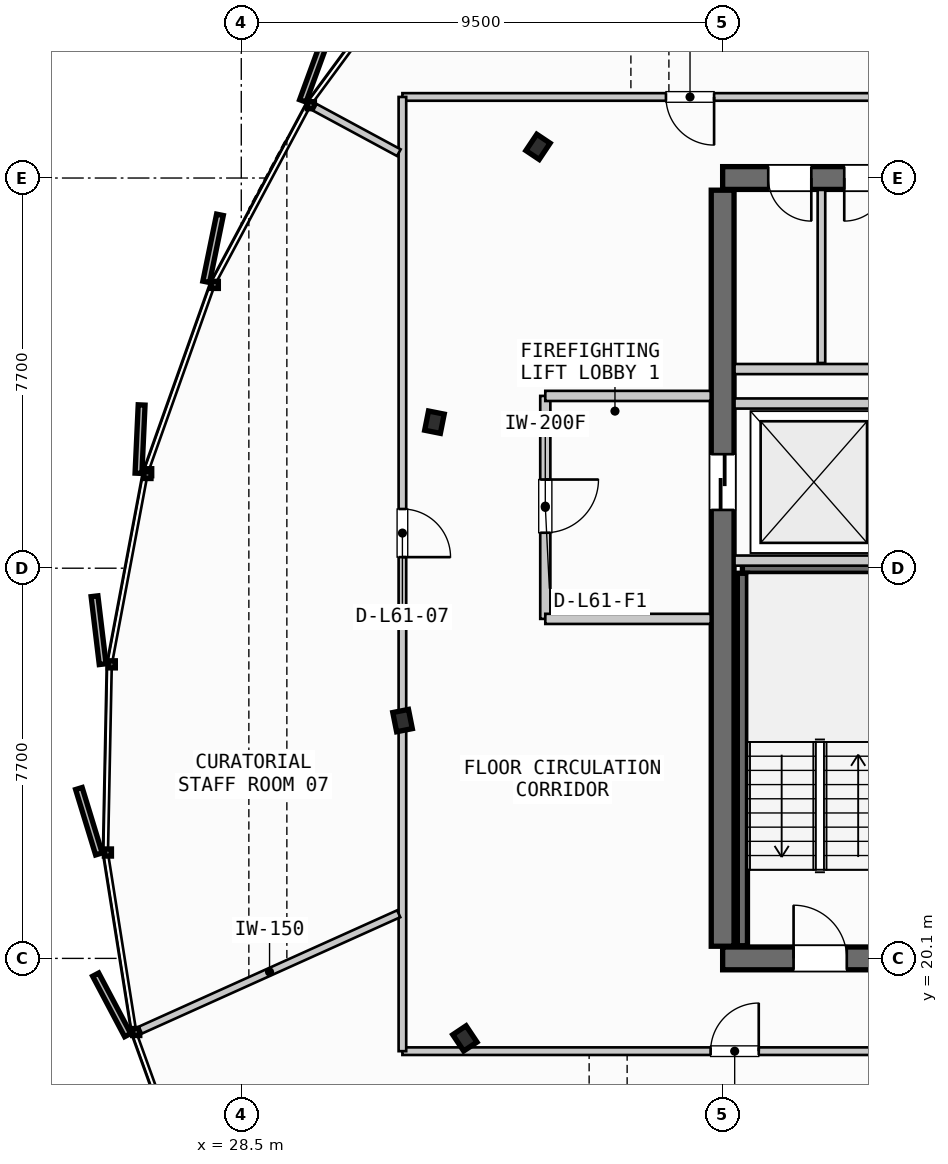
"""IFC4 building model, lengths in metres.
Left out: names, types, materials, properties, quantities, classifications, styles, units other than length and angle.
Written with IfcOpenShell. Run it as: python <this file> out.ifc"""

import sys

from ifc_helpers import new_model, si_unit, direction, frame, frame_2d, origin, origin_2d, place, context, subcontext, project, spatial, rectangle, i_section, extrude, source, transform, mapped, element, fill, save


model = new_model("IFC4")
c1 = context("Model", 3, precision=1e-05, world=origin(), true_north=direction((0.0, 1.0)))
c2 = subcontext(c1, "Body", "Model", "MODEL_VIEW")
j1 = project(units=[si_unit("LENGTHUNIT", "METRE"), si_unit("PLANEANGLEUNIT", "RADIAN")], contexts=[c1])
p1 = place(None, origin())
s1 = spatial("IfcSite", under=j1, at=p1, CompositionType="ELEMENT")
p2 = place(p1, origin())
s2 = spatial("IfcBuilding", under=s1, at=p2, CompositionType="ELEMENT")
p3 = place(p2, frame((0.0, 0.0, 235.3)))
s3 = spatial("IfcBuildingStorey", under=s2, at=p3, CompositionType="ELEMENT", Elevation=235.3)
p4 = place(p3, frame((38.0, 20.1, 0.0), z_axis=(0.0, 0.0, 1.0), x_axis=(1.0, 0.0, 0.0)))
e1 = element("IfcWall", 1, at=p4, inside=s3, PredefinedType="SHEAR", context=c2, shape_type="SweptSolid", body=[
    extrude(rectangle(XDim=17.6, YDim=0.45, at=frame_2d((8.8, 0.0))), origin(), (0.0, 0.0, 1.0), 3.21),
])
p5 = place(p4, frame((1.4, 0.0, 0.0)))
e2 = element("IfcOpeningElement", 2, at=p5, cuts=e1, PredefinedType="OPENING", context=c2, shape_type="SweptSolid", body=[
    extrude(rectangle(XDim=1.05, YDim=2.15, at=frame_2d((0.525, 1.075))), frame((0.0, 0.235, 0.0), z_axis=(0.0, -1.0, 0.0), x_axis=(1.0, 0.0, 0.0)), (0.0, 0.0, 1.0), 0.47),
])
p6 = place(p4, frame((15.15, 0.0, 0.0)))
e3 = element("IfcOpeningElement", 3, at=p6, cuts=e1, PredefinedType="OPENING", context=c2, shape_type="SweptSolid", body=[
    extrude(rectangle(XDim=1.05, YDim=2.15, at=frame_2d((0.525, 1.075))), frame((0.0, 0.235, 0.0), z_axis=(0.0, -1.0, 0.0), x_axis=(1.0, 0.0, 0.0)), (0.0, 0.0, 1.0), 0.47),
])
p7 = place(p4, frame((5.25, 0.0, 0.0)))
e4 = element("IfcOpeningElement", 4, at=p7, cuts=e1, PredefinedType="OPENING", context=c2, shape_type="SweptSolid", body=[
    extrude(rectangle(XDim=0.95, YDim=2.15, at=frame_2d((0.475, 1.075))), frame((0.0, 0.235, 0.0), z_axis=(0.0, -1.0, 0.0), x_axis=(1.0, 0.0, 0.0)), (0.0, 0.0, 1.0), 0.47),
])
p8 = place(p4, frame((11.4, 0.0, 0.0)))
e5 = element("IfcOpeningElement", 5, at=p8, cuts=e1, PredefinedType="OPENING", context=c2, shape_type="SweptSolid", body=[
    extrude(rectangle(XDim=0.95, YDim=2.15, at=frame_2d((0.475, 1.075))), frame((0.0, 0.235, 0.0), z_axis=(0.0, -1.0, 0.0), x_axis=(1.0, 0.0, 0.0)), (0.0, 0.0, 1.0), 0.47),
])
p9 = place(p3, frame((55.6, 35.5, 0.0), z_axis=(0.0, 0.0, 1.0), x_axis=(-1.0, 0.0, 0.0)))
e6 = element("IfcWall", 6, at=p9, inside=s3, PredefinedType="SHEAR", context=c2, shape_type="SweptSolid", body=[
    extrude(rectangle(XDim=17.6, YDim=0.45, at=frame_2d((8.8, 0.0))), origin(), (0.0, 0.0, 1.0), 3.21),
])
p10 = place(p9, frame((8.05, 0.0, 0.0)))
e7 = element("IfcOpeningElement", 7, at=p10, cuts=e6, PredefinedType="OPENING", context=c2, shape_type="SweptSolid", body=[
    extrude(rectangle(XDim=1.5, YDim=2.2, at=frame_2d((0.75, 1.1))), frame((0.0, 0.235, 0.0), z_axis=(0.0, -1.0, 0.0), x_axis=(1.0, 0.0, 0.0)), (0.0, 0.0, 1.0), 0.47),
])
p11 = place(p9, frame((15.85, 0.0, 0.0)))
e8 = element("IfcOpeningElement", 8, at=p11, cuts=e6, PredefinedType="OPENING", context=c2, shape_type="SweptSolid", body=[
    extrude(rectangle(XDim=0.85, YDim=2.15, at=frame_2d((0.425, 1.075))), frame((0.0, 0.235, 0.0), z_axis=(0.0, -1.0, 0.0), x_axis=(1.0, 0.0, 0.0)), (0.0, 0.0, 1.0), 0.47),
])
p12 = place(p9, frame((14.35, 0.0, 0.0)))
e9 = element("IfcOpeningElement", 9, at=p12, cuts=e6, PredefinedType="OPENING", context=c2, shape_type="SweptSolid", body=[
    extrude(rectangle(XDim=0.85, YDim=2.15, at=frame_2d((0.425, 1.075))), frame((0.0, 0.235, 0.0), z_axis=(0.0, -1.0, 0.0), x_axis=(1.0, 0.0, 0.0)), (0.0, 0.0, 1.0), 0.47),
])
p13 = place(p9, frame((12.3, 0.0, 0.0)))
e10 = element("IfcOpeningElement", 10, at=p13, cuts=e6, PredefinedType="OPENING", context=c2, shape_type="SweptSolid", body=[
    extrude(rectangle(XDim=0.95, YDim=2.15, at=frame_2d((0.475, 1.075))), frame((0.0, 0.235, 0.0), z_axis=(0.0, -1.0, 0.0), x_axis=(1.0, 0.0, 0.0)), (0.0, 0.0, 1.0), 0.47),
])
p14 = place(p9, frame((10.2, 0.0, 0.0)))
e11 = element("IfcOpeningElement", 11, at=p14, cuts=e6, PredefinedType="OPENING", context=c2, shape_type="SweptSolid", body=[
    extrude(rectangle(XDim=0.9, YDim=2.15, at=frame_2d((0.45, 1.075))), frame((0.0, 0.235, 0.0), z_axis=(0.0, -1.0, 0.0), x_axis=(1.0, 0.0, 0.0)), (0.0, 0.0, 1.0), 0.47),
])
p15 = place(p3, frame((38.0, 35.26, 0.0), z_axis=(0.0, 0.0, 1.0), x_axis=(0.0, -1.0, 0.0)))
e12 = element("IfcWall", 12, at=p15, inside=s3, PredefinedType="SHEAR", context=c2, shape_type="SweptSolid", body=[
    extrude(rectangle(XDim=14.92, YDim=0.45, at=frame_2d((7.46, 0.0))), origin(), (0.0, 0.0, 1.0), 3.21),
])
p16 = place(p15, frame((5.21, 0.0, 0.0)))
e13 = element("IfcOpeningElement", 13, at=p16, cuts=e12, PredefinedType="OPENING", context=c2, shape_type="SweptSolid", body=[
    extrude(rectangle(XDim=1.1, YDim=2.2, at=frame_2d((0.55, 1.1))), frame((0.0, 0.235, 0.0), z_axis=(0.0, -1.0, 0.0), x_axis=(1.0, 0.0, 0.0)), (0.0, 0.0, 1.0), 0.47),
])
m1 = source(origin(), c2, "Body", "SweptSolid", [
    extrude(i_section(OverallWidth=0.387, OverallDepth=0.316, WebThickness=0.019, FlangeThickness=0.028, FilletRadius=0.015, at=origin_2d()), origin(), (0.0, 0.0, 1.0), 3.21),
])
for number, where, z_axis, x_axis in (
    (14, (34.356, 36.115, 0.0), (0.0, 0.0, 1.0), (-0.831, 0.556, 0.0)),
    (15, (32.312, 30.682, 0.0), (0.0, 0.0, 1.0), (-0.981, 0.195, 0.0)),
    (16, (31.683, 24.793, 0.0), (0.0, 0.0, 1.0), (-0.981, -0.195, 0.0)),
    (17, (32.913, 18.521, 0.0), (0.0, 0.0, 1.0), (-0.831, -0.556, 0.0)),
):
    element("IfcColumn", number, at=place(p3, frame(where, z_axis=z_axis, x_axis=x_axis)), inside=s3, PredefinedType="COLUMN", context=c2, shape_type="MappedRepresentation", body=[
        mapped(m1, transform((0.0, 0.0, 0.0), scale=1.0)),
    ])
p17 = place(p3, frame((38.39, 27.8, 0.0), z_axis=(0.0, 0.0, 1.0), x_axis=(1.0, 0.0, 0.0)))
e18 = element("IfcWall", 18, at=p17, inside=s3, PredefinedType="SHEAR", context=c2, shape_type="SweptSolid", body=[
    extrude(rectangle(XDim=3.06, YDim=0.2, at=frame_2d((1.53, 0.0))), origin(), (0.0, 0.0, 1.0), 3.21),
])
p18 = place(p3, frame((38.39, 20.35, 0.0), z_axis=(0.0, 0.0, 1.0), x_axis=(0.0, 1.0, 0.0)))
e19 = element("IfcWall", 19, at=p18, inside=s3, PredefinedType="SHEAR", context=c2, shape_type="SweptSolid", body=[
    extrude(rectangle(XDim=7.35, YDim=0.2, at=frame_2d((3.675, 0.0))), origin(), (0.0, 0.0, 1.0), 3.21),
])
for number, where, z_axis, x_axis in (
    (20, (38.235, 27.95, 0.0), (0.0, 0.0, 1.0), (1.0, 0.0, 0.0)),
    (21, (38.235, 31.05, 0.0), (0.0, 0.0, 1.0), (1.0, 0.0, 0.0)),
):
    element("IfcWall", number, at=place(p3, frame(where, z_axis=z_axis, x_axis=x_axis)), inside=s3, PredefinedType="PARTITIONING", context=c2, shape_type="SweptSolid", body=[
        extrude(rectangle(XDim=2.915, YDim=0.2, at=frame_2d((1.458, 0.0))), origin(), (0.0, 0.0, 1.0), 2.28),
    ])
p19 = place(p3, frame((34.5, 31.2, 0.0), z_axis=(0.0, 0.0, 1.0), x_axis=(0.0, -1.0, 0.0)))
e22 = element("IfcWall", 22, at=p19, inside=s3, PredefinedType="PARTITIONING", context=c2, shape_type="SweptSolid", body=[
    extrude(rectangle(XDim=4.4, YDim=0.2, at=frame_2d((2.2, 0.0))), origin(), (0.0, 0.0, 1.0), 2.28),
])
p20 = place(p19, frame((1.65, 0.0, 0.0)))
e23 = element("IfcOpeningElement", 23, at=p20, cuts=e22, PredefinedType="OPENING", context=c2, shape_type="SweptSolid", body=[
    extrude(rectangle(XDim=1.05, YDim=2.15, at=frame_2d((0.525, 1.075))), frame((0.0, 0.11, 0.0), z_axis=(0.0, -1.0, 0.0), x_axis=(1.0, 0.0, 0.0)), (0.0, 0.0, 1.0), 0.22),
])
for number, where, z_axis, x_axis in (
    (24, (34.5, 26.8, 0.0), (0.0, 0.0, 1.0), (1.0, 0.0, 0.0)),
    (25, (34.5, 31.2, 0.0), (0.0, 0.0, 1.0), (1.0, 0.0, 0.0)),
):
    element("IfcWall", number, at=place(p3, frame(where, z_axis=z_axis, x_axis=x_axis)), inside=s3, PredefinedType="PARTITIONING", context=c2, shape_type="SweptSolid", body=[
        extrude(rectangle(XDim=3.265, YDim=0.2, at=frame_2d((1.632, 0.0))), origin(), (0.0, 0.0, 1.0), 2.28),
    ])
p21 = place(p3, frame((38.235, 31.73, 0.0), z_axis=(0.0, 0.0, 1.0), x_axis=(1.0, 0.0, 0.0)))
e26 = element("IfcWall", 26, at=p21, inside=s3, PredefinedType="PARTITIONING", context=c2, shape_type="SweptSolid", body=[
    extrude(rectangle(XDim=7.565, YDim=0.2, at=frame_2d((3.782, 0.0))), origin(), (0.0, 0.0, 1.0), 2.28),
])
p22 = place(p3, frame((39.95, 31.85, 0.0), z_axis=(0.0, 0.0, 1.0), x_axis=(0.0, 1.0, 0.0)))
e27 = element("IfcWall", 27, at=p22, inside=s3, PredefinedType="PARTITIONING", context=c2, shape_type="SweptSolid", body=[
    extrude(rectangle(XDim=3.415, YDim=0.15, at=frame_2d((1.708, 0.0))), origin(), (0.0, 0.0, 1.0), 2.28),
])
p23 = place(p3, frame((31.68, 18.269, 0.0), z_axis=(0.0, 0.0, 1.0), x_axis=(1.0, 0.0, 0.0)))
e28 = element("IfcWall", 28, at=p23, inside=s3, PredefinedType="PARTITIONING", context=c2, shape_type="SweptSolid", body=[
    extrude(rectangle(XDim=28.87, YDim=0.15, at=frame_2d((14.435, 0.0))), origin(), (0.0, 0.0, 1.0), 2.28),
])
p24 = place(p23, frame((6.083, 0.0, 0.0)))
e29 = element("IfcOpeningElement", 29, at=p24, cuts=e28, PredefinedType="OPENING", context=c2, shape_type="SweptSolid", body=[
    extrude(rectangle(XDim=0.95, YDim=2.15, at=frame_2d((0.475, 1.075))), frame((0.0, 0.085, 0.0), z_axis=(0.0, -1.0, 0.0), x_axis=(1.0, 0.0, 0.0)), (0.0, 0.0, 1.0), 0.17),
])
p25 = place(p23, frame((19.003, 0.0, 0.0)))
e30 = element("IfcOpeningElement", 30, at=p25, cuts=e28, PredefinedType="OPENING", context=c2, shape_type="SweptSolid", body=[
    extrude(rectangle(XDim=0.95, YDim=2.15, at=frame_2d((0.475, 1.075))), frame((0.0, 0.085, 0.0), z_axis=(0.0, -1.0, 0.0), x_axis=(1.0, 0.0, 0.0)), (0.0, 0.0, 1.0), 0.17),
])
p26 = place(p3, frame((60.55, 37.1, 0.0), z_axis=(0.0, 0.0, 1.0), x_axis=(-1.0, 0.0, 0.0)))
e31 = element("IfcWall", 31, at=p26, inside=s3, PredefinedType="PARTITIONING", context=c2, shape_type="SweptSolid", body=[
    extrude(rectangle(XDim=28.87, YDim=0.15, at=frame_2d((14.435, 0.0))), origin(), (0.0, 0.0, 1.0), 2.28),
])
p27 = place(p26, frame((4.478, 0.0, 0.0)))
e32 = element("IfcOpeningElement", 32, at=p27, cuts=e31, PredefinedType="OPENING", context=c2, shape_type="SweptSolid", body=[
    extrude(rectangle(XDim=0.95, YDim=2.15, at=frame_2d((0.475, 1.075))), frame((0.0, 0.085, 0.0), z_axis=(0.0, -1.0, 0.0), x_axis=(1.0, 0.0, 0.0)), (0.0, 0.0, 1.0), 0.17),
])
p28 = place(p26, frame((13.236, 0.0, 0.0)))
e33 = element("IfcOpeningElement", 33, at=p28, cuts=e31, PredefinedType="OPENING", context=c2, shape_type="SweptSolid", body=[
    extrude(rectangle(XDim=0.95, YDim=2.15, at=frame_2d((0.475, 1.075))), frame((0.0, 0.085, 0.0), z_axis=(0.0, -1.0, 0.0), x_axis=(1.0, 0.0, 0.0)), (0.0, 0.0, 1.0), 0.17),
])
p29 = place(p26, frame((22.719, 0.0, 0.0)))
e34 = element("IfcOpeningElement", 34, at=p29, cuts=e31, PredefinedType="OPENING", context=c2, shape_type="SweptSolid", body=[
    extrude(rectangle(XDim=0.95, YDim=2.15, at=frame_2d((0.475, 1.075))), frame((0.0, 0.085, 0.0), z_axis=(0.0, -1.0, 0.0), x_axis=(1.0, 0.0, 0.0)), (0.0, 0.0, 1.0), 0.17),
])
p30 = place(p3, frame((31.68, 37.1, 0.0), z_axis=(0.0, 0.0, 1.0), x_axis=(0.0, -1.0, 0.0)))
e35 = element("IfcWall", 35, at=p30, inside=s3, PredefinedType="PARTITIONING", context=c2, shape_type="SweptSolid", body=[
    extrude(rectangle(XDim=18.831, YDim=0.15, at=frame_2d((9.416, 0.0))), origin(), (0.0, 0.0, 1.0), 2.28),
])
p31 = place(p30, frame((8.132, 0.0, 0.0)))
e36 = element("IfcOpeningElement", 36, at=p31, cuts=e35, PredefinedType="OPENING", context=c2, shape_type="SweptSolid", body=[
    extrude(rectangle(XDim=0.95, YDim=2.15, at=frame_2d((0.475, 1.075))), frame((0.0, 0.085, 0.0), z_axis=(0.0, -1.0, 0.0), x_axis=(1.0, 0.0, 0.0)), (0.0, 0.0, 1.0), 0.17),
])
p32 = place(p3, frame((31.607, 20.981, 0.0), z_axis=(0.0, 0.0, 1.0), x_axis=(-0.911796467515, -0.410642425752, 0.0)))
e37 = element("IfcWall", 37, at=p32, inside=s3, PredefinedType="PARTITIONING", context=c2, shape_type="SweptSolid", body=[
    extrude(rectangle(XDim=5.592, YDim=0.15, at=frame_2d((2.796, 0.0))), origin(), (0.0, 0.0, 1.0), 2.28),
])
p33 = place(p3, frame((42.419, 37.173, 0.0), z_axis=(0.0, 0.0, 1.0), x_axis=(-0.4213841455, 0.906882242588, 0.0)))
e38 = element("IfcWall", 38, at=p33, inside=s3, PredefinedType="PARTITIONING", context=c2, shape_type="SweptSolid", body=[
    extrude(rectangle(XDim=9.28, YDim=0.15, at=frame_2d((4.64, 0.0))), origin(), (0.0, 0.0, 1.0), 2.28),
])
p34 = place(p3, frame((31.61, 36.0, 0.0), z_axis=(0.0, 0.0, 1.0), x_axis=(-0.879820822607, 0.475305501868, 0.0)))
e39 = element("IfcWall", 39, at=p34, inside=s3, PredefinedType="PARTITIONING", context=c2, shape_type="SweptSolid", body=[
    extrude(rectangle(XDim=1.883, YDim=0.15, at=frame_2d((0.941, 0.0))), origin(), (0.0, 0.0, 1.0), 2.28),
])
m2 = source(origin(), c2, "Body", "SweptSolid", [
    extrude(rectangle(XDim=1.05, YDim=2.15, at=frame_2d((0.525, 1.075))), frame((0.0, 0.025, 0.0), z_axis=(0.0, -1.0, 0.0), x_axis=(1.0, 0.0, 0.0)), (0.0, 0.0, 1.0), 0.05),
])
p35 = place(p5, origin())
e40 = element("IfcDoor", 40, at=p35, inside=s3, OperationType="SINGLE_SWING_LEFT", PredefinedType="DOOR", context=c2, shape_type="MappedRepresentation", body=[
    mapped(m2, transform((0.0, 0.0, 0.0), scale=1.0)),
])
fill(e2, e40)
m3 = source(origin(), c2, "Body", "SweptSolid", [
    extrude(rectangle(XDim=1.1, YDim=2.2, at=frame_2d((0.55, 1.1))), frame((0.0, 0.025, 0.0), z_axis=(0.0, -1.0, 0.0), x_axis=(1.0, 0.0, 0.0)), (0.0, 0.0, 1.0), 0.05),
])
p36 = place(p16, origin())
e41 = element("IfcDoor", 41, at=p36, inside=s3, OperationType="SLIDING_TO_LEFT", PredefinedType="DOOR", context=c2, shape_type="MappedRepresentation", body=[
    mapped(m3, transform((0.0, 0.0, 0.0), scale=1.0)),
])
fill(e13, e41)
m4 = source(origin(), c2, "Body", "SweptSolid", [
    extrude(rectangle(XDim=0.85, YDim=2.15, at=frame_2d((0.425, 1.075))), frame((0.0, 0.025, 0.0), z_axis=(0.0, -1.0, 0.0), x_axis=(1.0, 0.0, 0.0)), (0.0, 0.0, 1.0), 0.05),
])
p37 = place(p11, origin())
e42 = element("IfcDoor", 42, at=p37, inside=s3, OperationType="SINGLE_SWING_LEFT", PredefinedType="DOOR", context=c2, shape_type="MappedRepresentation", body=[
    mapped(m4, transform((0.0, 0.0, 0.0), scale=1.0)),
])
fill(e8, e42)
p38 = place(p12, origin())
e43 = element("IfcDoor", 43, at=p38, inside=s3, OperationType="SINGLE_SWING_RIGHT", PredefinedType="DOOR", context=c2, shape_type="MappedRepresentation", body=[
    mapped(m4, transform((0.0, 0.0, 0.0), scale=1.0)),
])
fill(e9, e43)
p39 = place(p20, origin())
e44 = element("IfcDoor", 44, at=p39, inside=s3, OperationType="SINGLE_SWING_LEFT", PredefinedType="DOOR", context=c2, shape_type="MappedRepresentation", body=[
    mapped(m2, transform((0.0, 0.0, 0.0), scale=1.0)),
])
fill(e23, e44)
m5 = source(origin(), c2, "Body", "SweptSolid", [
    extrude(rectangle(XDim=0.95, YDim=2.15, at=frame_2d((0.475, 1.075))), frame((0.0, 0.025, 0.0), z_axis=(0.0, -1.0, 0.0), x_axis=(1.0, 0.0, 0.0)), (0.0, 0.0, 1.0), 0.05),
])
p40 = place(p24, origin())
e45 = element("IfcDoor", 45, at=p40, inside=s3, OperationType="SINGLE_SWING_RIGHT", PredefinedType="DOOR", context=c2, shape_type="MappedRepresentation", body=[
    mapped(m5, transform((0.0, 0.0, 0.0), scale=1.0)),
])
fill(e29, e45)
p41 = place(p29, origin())
e46 = element("IfcDoor", 46, at=p41, inside=s3, OperationType="SINGLE_SWING_LEFT", PredefinedType="DOOR", context=c2, shape_type="MappedRepresentation", body=[
    mapped(m5, transform((0.0, 0.0, 0.0), scale=1.0)),
])
fill(e34, e46)
p42 = place(p31, origin())
e47 = element("IfcDoor", 47, at=p42, inside=s3, OperationType="SINGLE_SWING_RIGHT", PredefinedType="DOOR", context=c2, shape_type="MappedRepresentation", body=[
    mapped(m5, transform((0.0, 0.0, 0.0), scale=1.0)),
])
fill(e36, e47)
save(model, sys.argv[1])
